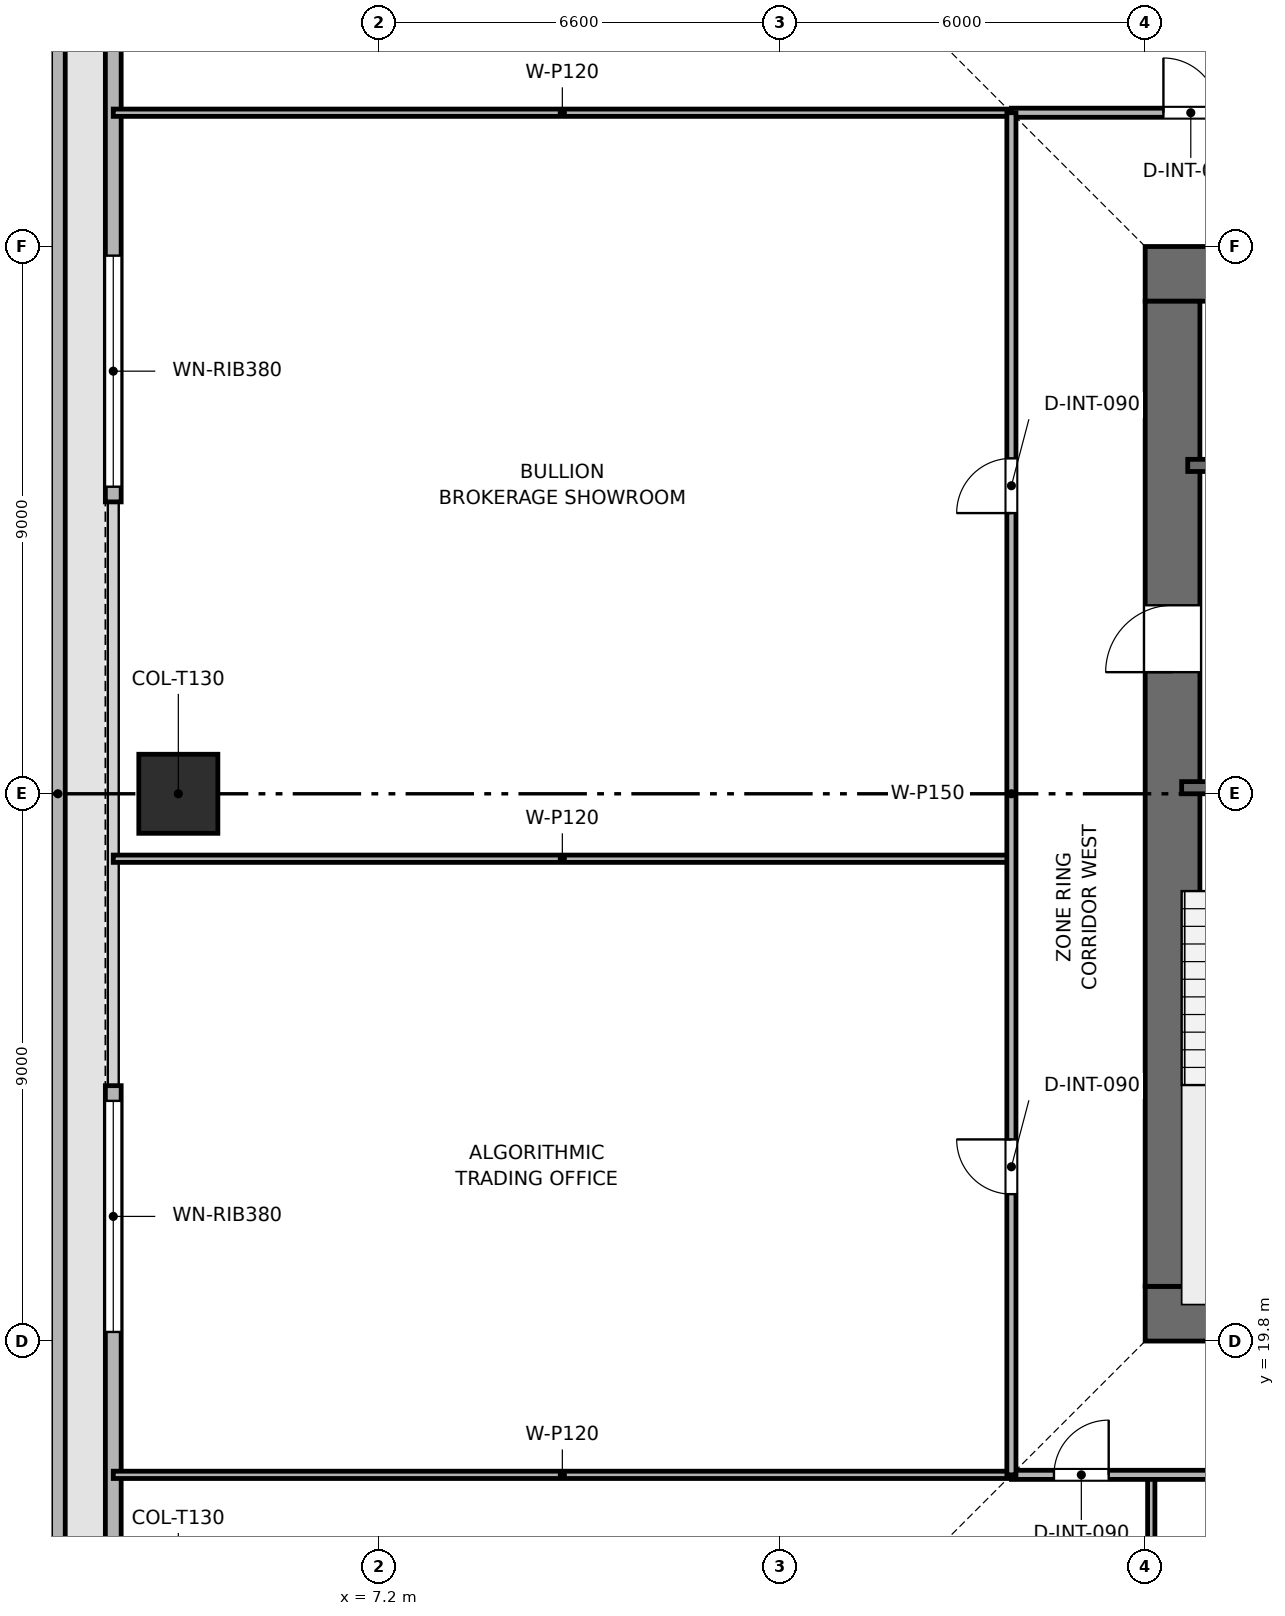
"""IFC4 building model, lengths in metres.
Left out: names, types, materials, properties, quantities, classifications, styles, units other than length and angle.
Written with IfcOpenShell. Run it as: python <this file> out.ifc"""

import sys

from ifc_helpers import new_model, si_unit, direction, frame, frame_2d, origin, origin_2d, place, context, subcontext, project, spatial, rectangle, extrude, element, fill, save


model = new_model("IFC4")
c1 = context("Model", 3, precision=1e-05, world=origin(), true_north=direction((0.0, 1.0)))
c2 = subcontext(c1, "Body", "Model", "MODEL_VIEW")
j1 = project(units=[si_unit("LENGTHUNIT", "METRE"), si_unit("PLANEANGLEUNIT", "RADIAN")], contexts=[c1])
p1 = place(None, origin())
s1 = spatial("IfcSite", under=j1, at=p1, CompositionType="ELEMENT")
p2 = place(p1, origin())
s2 = spatial("IfcBuilding", under=s1, at=p2, CompositionType="ELEMENT")
p3 = place(p2, frame((0.0, 0.0, 113.4)))
s3 = spatial("IfcBuildingStorey", under=s2, at=p3, CompositionType="ELEMENT", Elevation=113.4)
p4 = place(p3, frame((19.8, 20.25, 0.0), z_axis=(0.0, 0.0, 1.0), x_axis=(1.0, 0.0, 0.0)))
e1 = element("IfcWall", 1, at=p4, inside=s3, PredefinedType="SHEAR", context=c2, shape_type="SweptSolid", body=[
    extrude(rectangle(XDim=18.0, YDim=0.9, at=frame_2d((9.0, 0.0))), origin(), (0.0, 0.0, 1.0), 3.9),
])
p5 = place(p4, frame((8.4, 0.0, 0.0)))
e2 = element("IfcOpeningElement", 2, at=p5, cuts=e1, PredefinedType="OPENING", context=c2, shape_type="SweptSolid", body=[
    extrude(rectangle(XDim=1.2, YDim=2.2, at=frame_2d((0.6, 1.1))), frame((0.0, 0.46, 0.0), z_axis=(0.0, -1.0, 0.0), x_axis=(1.0, 0.0, 0.0)), (0.0, 0.0, 1.0), 0.92),
])
p6 = place(p3, frame((19.8, 37.35, 0.0), z_axis=(0.0, 0.0, 1.0), x_axis=(1.0, 0.0, 0.0)))
e3 = element("IfcWall", 3, at=p6, inside=s3, PredefinedType="SHEAR", context=c2, shape_type="SweptSolid", body=[
    extrude(rectangle(XDim=18.0, YDim=0.9, at=frame_2d((9.0, 0.0))), origin(), (0.0, 0.0, 1.0), 3.9),
])
p7 = place(p6, frame((7.05, 0.0, 0.0)))
e4 = element("IfcOpeningElement", 4, at=p7, cuts=e3, PredefinedType="OPENING", context=c2, shape_type="SweptSolid", body=[
    extrude(rectangle(XDim=1.1, YDim=2.15, at=frame_2d((0.55, 1.075))), frame((0.0, 0.46, 0.0), z_axis=(0.0, -1.0, 0.0), x_axis=(1.0, 0.0, 0.0)), (0.0, 0.0, 1.0), 0.92),
])
p8 = place(p3, frame((20.25, 20.7, 0.0), z_axis=(0.0, 0.0, 1.0), x_axis=(0.0, 1.0, 0.0)))
e5 = element("IfcWall", 5, at=p8, inside=s3, PredefinedType="SHEAR", context=c2, shape_type="SweptSolid", body=[
    extrude(rectangle(XDim=16.2, YDim=0.9, at=frame_2d((8.1, 0.0))), origin(), (0.0, 0.0, 1.0), 3.9),
])
p9 = place(p8, frame((10.1, 0.0, 0.0)))
e6 = element("IfcOpeningElement", 6, at=p9, cuts=e5, PredefinedType="OPENING", context=c2, shape_type="SweptSolid", body=[
    extrude(rectangle(XDim=1.1, YDim=2.15, at=frame_2d((0.55, 1.075))), frame((0.0, 0.46, 0.0), z_axis=(0.0, -1.0, 0.0), x_axis=(1.0, 0.0, 0.0)), (0.0, 0.0, 1.0), 0.92),
])
p10 = place(p3, frame((3.9, 28.8, 0.003), z_axis=(0.0, 0.0, 1.0), x_axis=(1.0, 0.0, 0.0)))
e7 = element("IfcColumn", 7, at=p10, inside=s3, PredefinedType="COLUMN", context=c2, shape_type="SweptSolid", body=[
    extrude(rectangle(XDim=1.3, YDim=1.3, at=origin_2d()), origin(), (0.0, 0.0, 1.0), 3.644),
])
p11 = place(p3, frame((1.92, 48.045, 0.0), z_axis=(0.0, 0.0, 1.0), x_axis=(0.0, -1.0, 0.0)))
e8 = element("IfcWall", 8, at=p11, inside=s3, PredefinedType="PARAPET", context=c2, shape_type="SweptSolid", body=[
    extrude(rectangle(XDim=38.49, YDim=0.24, at=frame_2d((19.245, 0.0))), origin(), (0.0, 0.0, 1.0), 1.2),
])
p12 = place(p3, frame((2.83, 9.9, 0.0), z_axis=(0.0, 0.0, 1.0), x_axis=(0.0, 1.0, 0.0)))
e9 = element("IfcWall", 9, at=p12, inside=s3, PredefinedType="SOLIDWALL", context=c2, shape_type="SweptSolid", body=[
    extrude(rectangle(XDim=14.1, YDim=0.26, at=frame_2d((7.05, 0.0))), origin(), (0.0, 0.0, 1.0), 3.65),
])
p13 = place(p12, frame((10.05, 0.0, 0.9)))
e10 = element("IfcOpeningElement", 10, at=p13, cuts=e9, PredefinedType="OPENING", context=c2, shape_type="SweptSolid", body=[
    extrude(rectangle(XDim=3.8, YDim=1.9, at=frame_2d((1.9, 0.95))), frame((0.0, 0.14, 0.0), z_axis=(0.0, -1.0, 0.0), x_axis=(1.0, 0.0, 0.0)), (0.0, 0.0, 1.0), 0.28),
])
p14 = place(p3, frame((2.83, 33.6, 0.0), z_axis=(0.0, 0.0, 1.0), x_axis=(0.0, 1.0, 0.0)))
e11 = element("IfcWall", 11, at=p14, inside=s3, PredefinedType="SOLIDWALL", context=c2, shape_type="SweptSolid", body=[
    extrude(rectangle(XDim=14.1, YDim=0.26, at=frame_2d((7.05, 0.0))), origin(), (0.0, 0.0, 1.0), 3.65),
])
p15 = place(p14, frame((0.25, 0.0, 0.9)))
e12 = element("IfcOpeningElement", 12, at=p15, cuts=e11, PredefinedType="OPENING", context=c2, shape_type="SweptSolid", body=[
    extrude(rectangle(XDim=3.8, YDim=1.9, at=frame_2d((1.9, 0.95))), frame((0.0, 0.14, 0.0), z_axis=(0.0, -1.0, 0.0), x_axis=(1.0, 0.0, 0.0)), (0.0, 0.0, 1.0), 0.28),
])
p16 = place(p3, frame((20.4, 28.9, 0.0), z_axis=(0.0, 0.0, 1.0), x_axis=(1.0, 0.0, 0.0)))
e13 = element("IfcWall", 13, at=p16, inside=s3, PredefinedType="SHEAR", context=c2, shape_type="SweptSolid", body=[
    extrude(rectangle(XDim=3.15, YDim=0.2, at=frame_2d((1.575, 0.0))), origin(), (0.0, 0.0, 1.0), 3.65),
])
p17 = place(p16, frame((0.8, 0.0, 0.0)))
e14 = element("IfcOpeningElement", 14, at=p17, cuts=e13, PredefinedType="OPENING", context=c2, shape_type="SweptSolid", body=[
    extrude(rectangle(XDim=1.0, YDim=2.1, at=frame_2d((0.5, 1.05))), frame((0.0, 0.11, 0.0), z_axis=(0.0, -1.0, 0.0), x_axis=(1.0, 0.0, 0.0)), (0.0, 0.0, 1.0), 0.22),
])
p18 = place(p3, frame((20.5, 34.2, 0.0), z_axis=(0.0, 0.0, 1.0), x_axis=(1.0, 0.0, 0.0)))
e15 = element("IfcWall", 15, at=p18, inside=s3, PredefinedType="SHEAR", context=c2, shape_type="SweptSolid", body=[
    extrude(rectangle(XDim=3.05, YDim=0.2, at=frame_2d((1.525, 0.0))), origin(), (0.0, 0.0, 1.0), 3.65),
])
p19 = place(p18, frame((0.75, 0.0, 0.0)))
e16 = element("IfcOpeningElement", 16, at=p19, cuts=e15, PredefinedType="OPENING", context=c2, shape_type="SweptSolid", body=[
    extrude(rectangle(XDim=1.1, YDim=2.15, at=frame_2d((0.55, 1.075))), frame((0.0, 0.11, 0.0), z_axis=(0.0, -1.0, 0.0), x_axis=(1.0, 0.0, 0.0)), (0.0, 0.0, 1.0), 0.22),
])
for number, where, z_axis, x_axis in (
    (17, (19.9, 2.83, 0.0), (0.0, 0.0, 1.0), (0.0, 1.0, 0.0)),
    (18, (2.83, 17.6, 0.0), (0.0, 0.0, 1.0), (1.0, 0.0, 0.0)),
    (19, (2.83, 40.0, 0.0), (0.0, 0.0, 1.0), (1.0, 0.0, 0.0)),
    (20, (2.83, 27.732, 0.0), (0.0, 0.0, 1.0), (1.0, 0.0, 0.0)),
):
    element("IfcWall", number, at=place(p3, frame(where, z_axis=z_axis, x_axis=x_axis)), inside=s3, PredefinedType="PARTITIONING", context=c2, shape_type="SweptSolid", body=[
        extrude(rectangle(XDim=14.77, YDim=0.12, at=frame_2d((7.385, 0.0))), origin(), (0.0, 0.0, 1.0), 3.035),
    ])
p20 = place(p3, frame((17.6, 17.6, 0.0), z_axis=(0.0, 0.0, 1.0), x_axis=(1.0, 0.0, 0.0)))
e21 = element("IfcWall", 21, at=p20, inside=s3, PredefinedType="PARTITIONING", context=c2, shape_type="SweptSolid", body=[
    extrude(rectangle(XDim=22.4, YDim=0.15, at=frame_2d((11.2, 0.0))), origin(), (0.0, 0.0, 1.0), 3.185),
])
p21 = place(p20, frame((0.7, 0.0, 0.0)))
e22 = element("IfcOpeningElement", 22, at=p21, cuts=e21, PredefinedType="OPENING", context=c2, shape_type="SweptSolid", body=[
    extrude(rectangle(XDim=0.9, YDim=2.1, at=frame_2d((0.45, 1.05))), frame((0.0, 0.085, 0.0), z_axis=(0.0, -1.0, 0.0), x_axis=(1.0, 0.0, 0.0)), (0.0, 0.0, 1.0), 0.17),
])
p22 = place(p20, frame((4.907, 0.0, 0.0)))
e23 = element("IfcOpeningElement", 23, at=p22, cuts=e21, PredefinedType="OPENING", context=c2, shape_type="SweptSolid", body=[
    extrude(rectangle(XDim=0.9, YDim=2.1, at=frame_2d((0.45, 1.05))), frame((0.0, 0.085, 0.0), z_axis=(0.0, -1.0, 0.0), x_axis=(1.0, 0.0, 0.0)), (0.0, 0.0, 1.0), 0.17),
])
p23 = place(p20, frame((10.848, 0.0, 0.0)))
e24 = element("IfcOpeningElement", 24, at=p23, cuts=e21, PredefinedType="OPENING", context=c2, shape_type="SweptSolid", body=[
    extrude(rectangle(XDim=0.9, YDim=2.1, at=frame_2d((0.45, 1.05))), frame((0.0, 0.085, 0.0), z_axis=(0.0, -1.0, 0.0), x_axis=(1.0, 0.0, 0.0)), (0.0, 0.0, 1.0), 0.17),
])
p24 = place(p20, frame((17.84, 0.0, 0.0)))
e25 = element("IfcOpeningElement", 25, at=p24, cuts=e21, PredefinedType="OPENING", context=c2, shape_type="SweptSolid", body=[
    extrude(rectangle(XDim=0.9, YDim=2.1, at=frame_2d((0.45, 1.05))), frame((0.0, 0.085, 0.0), z_axis=(0.0, -1.0, 0.0), x_axis=(1.0, 0.0, 0.0)), (0.0, 0.0, 1.0), 0.17),
])
p25 = place(p3, frame((17.6, 40.0, 0.0), z_axis=(0.0, 0.0, 1.0), x_axis=(1.0, 0.0, 0.0)))
e26 = element("IfcWall", 26, at=p25, inside=s3, PredefinedType="PARTITIONING", context=c2, shape_type="SweptSolid", body=[
    extrude(rectangle(XDim=22.4, YDim=0.15, at=frame_2d((11.2, 0.0))), origin(), (0.0, 0.0, 1.0), 3.185),
])
p26 = place(p25, frame((2.5, 0.0, 0.0)))
e27 = element("IfcOpeningElement", 27, at=p26, cuts=e26, PredefinedType="OPENING", context=c2, shape_type="SweptSolid", body=[
    extrude(rectangle(XDim=0.9, YDim=2.1, at=frame_2d((0.45, 1.05))), frame((0.0, 0.085, 0.0), z_axis=(0.0, -1.0, 0.0), x_axis=(1.0, 0.0, 0.0)), (0.0, 0.0, 1.0), 0.17),
])
p27 = place(p25, frame((6.85, 0.0, 0.0)))
e28 = element("IfcOpeningElement", 28, at=p27, cuts=e26, PredefinedType="OPENING", context=c2, shape_type="SweptSolid", body=[
    extrude(rectangle(XDim=0.9, YDim=2.1, at=frame_2d((0.45, 1.05))), frame((0.0, 0.085, 0.0), z_axis=(0.0, -1.0, 0.0), x_axis=(1.0, 0.0, 0.0)), (0.0, 0.0, 1.0), 0.17),
])
p28 = place(p25, frame((9.75, 0.0, 0.0)))
e29 = element("IfcOpeningElement", 29, at=p28, cuts=e26, PredefinedType="OPENING", context=c2, shape_type="SweptSolid", body=[
    extrude(rectangle(XDim=0.9, YDim=2.1, at=frame_2d((0.45, 1.05))), frame((0.0, 0.085, 0.0), z_axis=(0.0, -1.0, 0.0), x_axis=(1.0, 0.0, 0.0)), (0.0, 0.0, 1.0), 0.17),
])
p29 = place(p25, frame((12.5, 0.0, 0.0)))
e30 = element("IfcOpeningElement", 30, at=p29, cuts=e26, PredefinedType="OPENING", context=c2, shape_type="SweptSolid", body=[
    extrude(rectangle(XDim=0.95, YDim=2.1, at=frame_2d((0.475, 1.05))), frame((0.0, 0.085, 0.0), z_axis=(0.0, -1.0, 0.0), x_axis=(1.0, 0.0, 0.0)), (0.0, 0.0, 1.0), 0.17),
])
p30 = place(p25, frame((17.9, 0.0, 0.0)))
e31 = element("IfcOpeningElement", 31, at=p30, cuts=e26, PredefinedType="OPENING", context=c2, shape_type="SweptSolid", body=[
    extrude(rectangle(XDim=0.9, YDim=2.1, at=frame_2d((0.45, 1.05))), frame((0.0, 0.085, 0.0), z_axis=(0.0, -1.0, 0.0), x_axis=(1.0, 0.0, 0.0)), (0.0, 0.0, 1.0), 0.17),
])
p31 = place(p3, frame((17.6, 17.6, 0.0), z_axis=(0.0, 0.0, 1.0), x_axis=(0.0, 1.0, 0.0)))
e32 = element("IfcWall", 32, at=p31, inside=s3, PredefinedType="PARTITIONING", context=c2, shape_type="SweptSolid", body=[
    extrude(rectangle(XDim=22.4, YDim=0.15, at=frame_2d((11.2, 0.0))), origin(), (0.0, 0.0, 1.0), 3.185),
])
p32 = place(p31, frame((4.616, 0.0, 0.0)))
e33 = element("IfcOpeningElement", 33, at=p32, cuts=e32, PredefinedType="OPENING", context=c2, shape_type="SweptSolid", body=[
    extrude(rectangle(XDim=0.9, YDim=2.1, at=frame_2d((0.45, 1.05))), frame((0.0, 0.085, 0.0), z_axis=(0.0, -1.0, 0.0), x_axis=(1.0, 0.0, 0.0)), (0.0, 0.0, 1.0), 0.17),
])
p33 = place(p31, frame((15.816, 0.0, 0.0)))
e34 = element("IfcOpeningElement", 34, at=p33, cuts=e32, PredefinedType="OPENING", context=c2, shape_type="SweptSolid", body=[
    extrude(rectangle(XDim=0.9, YDim=2.1, at=frame_2d((0.45, 1.05))), frame((0.0, 0.085, 0.0), z_axis=(0.0, -1.0, 0.0), x_axis=(1.0, 0.0, 0.0)), (0.0, 0.0, 1.0), 0.17),
])
p34 = place(p13, origin())
e35 = element("IfcWindow", 35, at=p34, inside=s3, PartitioningType="SINGLE_PANEL", PredefinedType="WINDOW", context=c2, shape_type="SweptSolid", body=[
    extrude(rectangle(XDim=3.8, YDim=1.9, at=frame_2d((1.9, 0.95))), frame((0.0, 0.03, 0.0), z_axis=(0.0, -1.0, 0.0), x_axis=(1.0, 0.0, 0.0)), (0.0, 0.0, 1.0), 0.06),
])
fill(e10, e35)
p35 = place(p15, origin())
e36 = element("IfcWindow", 36, at=p35, inside=s3, PartitioningType="SINGLE_PANEL", PredefinedType="WINDOW", context=c2, shape_type="SweptSolid", body=[
    extrude(rectangle(XDim=3.8, YDim=1.9, at=frame_2d((1.9, 0.95))), frame((0.0, 0.03, 0.0), z_axis=(0.0, -1.0, 0.0), x_axis=(1.0, 0.0, 0.0)), (0.0, 0.0, 1.0), 0.06),
])
fill(e12, e36)
p36 = place(p21, origin())
e37 = element("IfcDoor", 37, at=p36, inside=s3, OperationType="SINGLE_SWING_RIGHT", PredefinedType="DOOR", context=c2, shape_type="SweptSolid", body=[
    extrude(rectangle(XDim=0.9, YDim=2.1, at=frame_2d((0.45, 1.05))), frame((0.0, 0.025, 0.0), z_axis=(0.0, -1.0, 0.0), x_axis=(1.0, 0.0, 0.0)), (0.0, 0.0, 1.0), 0.05),
])
fill(e22, e37)
p37 = place(p26, origin())
e38 = element("IfcDoor", 38, at=p37, inside=s3, OperationType="SINGLE_SWING_LEFT", PredefinedType="DOOR", context=c2, shape_type="SweptSolid", body=[
    extrude(rectangle(XDim=0.9, YDim=2.1, at=frame_2d((0.45, 1.05))), frame((0.0, 0.025, 0.0), z_axis=(0.0, -1.0, 0.0), x_axis=(1.0, 0.0, 0.0)), (0.0, 0.0, 1.0), 0.05),
])
fill(e27, e38)
p38 = place(p32, origin())
e39 = element("IfcDoor", 39, at=p38, inside=s3, OperationType="SINGLE_SWING_RIGHT", PredefinedType="DOOR", context=c2, shape_type="SweptSolid", body=[
    extrude(rectangle(XDim=0.9, YDim=2.1, at=frame_2d((0.45, 1.05))), frame((0.0, 0.025, 0.0), z_axis=(0.0, -1.0, 0.0), x_axis=(1.0, 0.0, 0.0)), (0.0, 0.0, 1.0), 0.05),
])
fill(e33, e39)
p39 = place(p33, origin())
e40 = element("IfcDoor", 40, at=p39, inside=s3, OperationType="SINGLE_SWING_LEFT", PredefinedType="DOOR", context=c2, shape_type="SweptSolid", body=[
    extrude(rectangle(XDim=0.9, YDim=2.1, at=frame_2d((0.45, 1.05))), frame((0.0, 0.025, 0.0), z_axis=(0.0, -1.0, 0.0), x_axis=(1.0, 0.0, 0.0)), (0.0, 0.0, 1.0), 0.05),
])
fill(e34, e40)
p40 = place(p9, origin())
e41 = element("IfcDoor", 41, at=p40, inside=s3, OperationType="SINGLE_SWING_LEFT", PredefinedType="DOOR", context=c2, shape_type="SweptSolid", body=[
    extrude(rectangle(XDim=1.1, YDim=2.15, at=frame_2d((0.55, 1.075))), frame((0.0, 0.025, 0.0), z_axis=(0.0, -1.0, 0.0), x_axis=(1.0, 0.0, 0.0)), (0.0, 0.0, 1.0), 0.05),
])
fill(e6, e41)
save(model, sys.argv[1])
